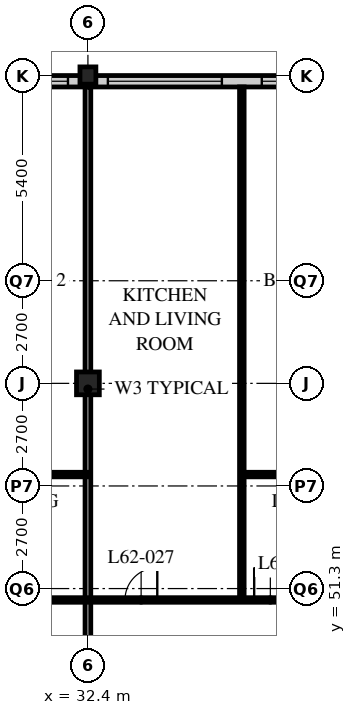
"""IFC4 building model, lengths in metres.
Left out: names, types, materials, properties, quantities, classifications, styles, units other than length and angle.
Written with IfcOpenShell. Run it as: python <this file> out.ifc"""

import sys

from ifc_helpers import new_model, si_unit, direction, frame, frame_2d, origin, origin_2d, place, context, subcontext, project, spatial, rectangle, hollow_rectangle, i_section, extrude, element, fill, save


model = new_model("IFC4")
c1 = context("Model", 3, precision=1e-05, world=origin(), true_north=direction((0.0, 1.0)))
c2 = subcontext(c1, "Body", "Model", "MODEL_VIEW")
j1 = project(units=[si_unit("LENGTHUNIT", "METRE"), si_unit("PLANEANGLEUNIT", "RADIAN")], contexts=[c1])
p1 = place(None, origin())
s1 = spatial("IfcSite", under=j1, at=p1, CompositionType="ELEMENT")
p2 = place(p1, origin())
s2 = spatial("IfcBuilding", under=s1, at=p2, CompositionType="ELEMENT")
p3 = place(p2, frame((0.0, 0.0, 242.4)))
s3 = spatial("IfcBuildingStorey", under=s2, at=p3, CompositionType="ELEMENT", Elevation=242.4)
p4 = place(p3, frame((32.4, 56.7, 0.0), z_axis=(0.0, 0.0, 1.0), x_axis=(1.0, 0.0, 0.0)))
e1 = element("IfcColumn", 1, at=p4, inside=s3, PredefinedType="COLUMN", context=c2, shape_type="SweptSolid", body=[
    extrude(hollow_rectangle(XDim=0.6, YDim=0.6, WallThickness=0.05, at=origin_2d()), origin(), (0.0, 0.0, 1.0), 3.9),
])
p5 = place(p3, frame((32.4, 64.8, 0.0), z_axis=(0.0, 0.0, 1.0), x_axis=(1.0, 0.0, 0.0)))
e2 = element("IfcColumn", 2, at=p5, inside=s3, PredefinedType="COLUMN", context=c2, shape_type="SweptSolid", body=[
    extrude(i_section(OverallWidth=0.418, OverallDepth=0.456, WebThickness=0.042, FlangeThickness=0.067, FilletRadius=0.015, at=origin_2d()), origin(), (0.0, 0.0, 1.0), 3.9),
])
p6 = place(p3, frame((48.3, 64.65, 0.0), z_axis=(0.0, 0.0, 1.0), x_axis=(-1.0, 0.0, 0.0)))
e3 = element("IfcWall", 3, at=p6, inside=s3, PredefinedType="SOLIDWALL", context=c2, shape_type="SweptSolid", body=[
    extrude(rectangle(XDim=40.2, YDim=0.3, at=frame_2d((20.1, 0.0))), origin(), (0.0, 0.0, 1.0), 3.69),
])
p7 = place(p6, frame((0.225, 0.0, 0.6)))
e4 = element("IfcOpeningElement", 4, at=p7, cuts=e3, PredefinedType="OPENING", context=c2, shape_type="SweptSolid", body=[
    extrude(rectangle(XDim=3.0, YDim=2.3, at=frame_2d((1.5, 1.15))), frame((0.0, 0.16, 0.0), z_axis=(0.0, -1.0, 0.0), x_axis=(1.0, 0.0, 0.0)), (0.0, 0.0, 1.0), 0.32),
])
p8 = place(p6, frame((4.275, 0.0, 0.6)))
e5 = element("IfcOpeningElement", 5, at=p8, cuts=e3, PredefinedType="OPENING", context=c2, shape_type="SweptSolid", body=[
    extrude(rectangle(XDim=3.0, YDim=2.3, at=frame_2d((1.5, 1.15))), frame((0.0, 0.16, 0.0), z_axis=(0.0, -1.0, 0.0), x_axis=(1.0, 0.0, 0.0)), (0.0, 0.0, 1.0), 0.32),
])
p9 = place(p6, frame((8.325, 0.0, 0.6)))
e6 = element("IfcOpeningElement", 6, at=p9, cuts=e3, PredefinedType="OPENING", context=c2, shape_type="SweptSolid", body=[
    extrude(rectangle(XDim=3.0, YDim=2.3, at=frame_2d((1.5, 1.15))), frame((0.0, 0.16, 0.0), z_axis=(0.0, -1.0, 0.0), x_axis=(1.0, 0.0, 0.0)), (0.0, 0.0, 1.0), 0.32),
])
p10 = place(p6, frame((12.375, 0.0, 0.6)))
e7 = element("IfcOpeningElement", 7, at=p10, cuts=e3, PredefinedType="OPENING", context=c2, shape_type="SweptSolid", body=[
    extrude(rectangle(XDim=3.0, YDim=2.3, at=frame_2d((1.5, 1.15))), frame((0.0, 0.16, 0.0), z_axis=(0.0, -1.0, 0.0), x_axis=(1.0, 0.0, 0.0)), (0.0, 0.0, 1.0), 0.32),
])
p11 = place(p6, frame((16.425, 0.0, 0.6)))
e8 = element("IfcOpeningElement", 8, at=p11, cuts=e3, PredefinedType="OPENING", context=c2, shape_type="SweptSolid", body=[
    extrude(rectangle(XDim=3.0, YDim=2.3, at=frame_2d((1.5, 1.15))), frame((0.0, 0.16, 0.0), z_axis=(0.0, -1.0, 0.0), x_axis=(1.0, 0.0, 0.0)), (0.0, 0.0, 1.0), 0.32),
])
p12 = place(p6, frame((20.475, 0.0, 0.6)))
e9 = element("IfcOpeningElement", 9, at=p12, cuts=e3, PredefinedType="OPENING", context=c2, shape_type="SweptSolid", body=[
    extrude(rectangle(XDim=3.0, YDim=2.3, at=frame_2d((1.5, 1.15))), frame((0.0, 0.16, 0.0), z_axis=(0.0, -1.0, 0.0), x_axis=(1.0, 0.0, 0.0)), (0.0, 0.0, 1.0), 0.32),
])
p13 = place(p6, frame((24.525, 0.0, 0.6)))
e10 = element("IfcOpeningElement", 10, at=p13, cuts=e3, PredefinedType="OPENING", context=c2, shape_type="SweptSolid", body=[
    extrude(rectangle(XDim=3.0, YDim=2.3, at=frame_2d((1.5, 1.15))), frame((0.0, 0.16, 0.0), z_axis=(0.0, -1.0, 0.0), x_axis=(1.0, 0.0, 0.0)), (0.0, 0.0, 1.0), 0.32),
])
p14 = place(p6, frame((28.575, 0.0, 0.6)))
e11 = element("IfcOpeningElement", 11, at=p14, cuts=e3, PredefinedType="OPENING", context=c2, shape_type="SweptSolid", body=[
    extrude(rectangle(XDim=3.0, YDim=2.3, at=frame_2d((1.5, 1.15))), frame((0.0, 0.16, 0.0), z_axis=(0.0, -1.0, 0.0), x_axis=(1.0, 0.0, 0.0)), (0.0, 0.0, 1.0), 0.32),
])
p15 = place(p6, frame((32.625, 0.0, 0.6)))
e12 = element("IfcOpeningElement", 12, at=p15, cuts=e3, PredefinedType="OPENING", context=c2, shape_type="SweptSolid", body=[
    extrude(rectangle(XDim=3.0, YDim=2.3, at=frame_2d((1.5, 1.15))), frame((0.0, 0.16, 0.0), z_axis=(0.0, -1.0, 0.0), x_axis=(1.0, 0.0, 0.0)), (0.0, 0.0, 1.0), 0.32),
])
p16 = place(p6, frame((36.675, 0.0, 0.6)))
e13 = element("IfcOpeningElement", 13, at=p16, cuts=e3, PredefinedType="OPENING", context=c2, shape_type="SweptSolid", body=[
    extrude(rectangle(XDim=3.0, YDim=2.3, at=frame_2d((1.5, 1.15))), frame((0.0, 0.16, 0.0), z_axis=(0.0, -1.0, 0.0), x_axis=(1.0, 0.0, 0.0)), (0.0, 0.0, 1.0), 0.32),
])
p17 = place(p3, frame((32.4, 48.6, 0.0), z_axis=(0.0, 0.0, 1.0), x_axis=(0.0, 1.0, 0.0)))
e14 = element("IfcWall", 14, at=p17, inside=s3, PredefinedType="PARTITIONING", context=c2, shape_type="SweptSolid", body=[
    extrude(rectangle(XDim=15.9, YDim=0.15, at=frame_2d((7.95, 0.0))), origin(), (0.0, 0.0, 1.0), 2.928),
])
p18 = place(p3, frame((36.45, 51.0, 0.0), z_axis=(0.0, 0.0, 1.0), x_axis=(0.0, 1.0, 0.0)))
e15 = element("IfcWall", 15, at=p18, inside=s3, PredefinedType="PARTITIONING", context=c2, shape_type="SweptSolid", body=[
    extrude(rectangle(XDim=13.5, YDim=0.12, at=frame_2d((6.75, 0.0))), origin(), (0.0, 0.0, 1.0), 3.69),
])
p19 = place(p3, frame((8.15, 51.0, 0.0), z_axis=(0.0, 0.0, 1.0), x_axis=(1.0, 0.0, 0.0)))
e16 = element("IfcWall", 16, at=p19, inside=s3, PredefinedType="PARTITIONING", context=c2, shape_type="SweptSolid", body=[
    extrude(rectangle(XDim=40.4, YDim=0.12, at=frame_2d((20.2, 0.0))), origin(), (0.0, 0.0, 1.0), 3.69),
])
p20 = place(p19, frame((9.025, 0.0, 0.0)))
e17 = element("IfcOpeningElement", 17, at=p20, cuts=e16, PredefinedType="OPENING", context=c2, shape_type="SweptSolid", body=[
    extrude(rectangle(XDim=0.85, YDim=2.1, at=frame_2d((0.425, 1.05))), frame((0.0, 0.07, 0.0), z_axis=(0.0, -1.0, 0.0), x_axis=(1.0, 0.0, 0.0)), (0.0, 0.0, 1.0), 0.14),
])
p21 = place(p19, frame((16.475, 0.0, 0.0)))
e18 = element("IfcOpeningElement", 18, at=p21, cuts=e16, PredefinedType="OPENING", context=c2, shape_type="SweptSolid", body=[
    extrude(rectangle(XDim=0.85, YDim=2.1, at=frame_2d((0.425, 1.05))), frame((0.0, 0.07, 0.0), z_axis=(0.0, -1.0, 0.0), x_axis=(1.0, 0.0, 0.0)), (0.0, 0.0, 1.0), 0.14),
])
p22 = place(p19, frame((20.525, 0.0, 0.0)))
e19 = element("IfcOpeningElement", 19, at=p22, cuts=e16, PredefinedType="OPENING", context=c2, shape_type="SweptSolid", body=[
    extrude(rectangle(XDim=0.85, YDim=2.1, at=frame_2d((0.425, 1.05))), frame((0.0, 0.07, 0.0), z_axis=(0.0, -1.0, 0.0), x_axis=(1.0, 0.0, 0.0)), (0.0, 0.0, 1.0), 0.14),
])
p23 = place(p19, frame((25.225, 0.0, 0.0)))
e20 = element("IfcOpeningElement", 20, at=p23, cuts=e16, PredefinedType="OPENING", context=c2, shape_type="SweptSolid", body=[
    extrude(rectangle(XDim=0.85, YDim=2.1, at=frame_2d((0.425, 1.05))), frame((0.0, 0.07, 0.0), z_axis=(0.0, -1.0, 0.0), x_axis=(1.0, 0.0, 0.0)), (0.0, 0.0, 1.0), 0.14),
])
p24 = place(p19, frame((28.625, 0.0, 0.0)))
e21 = element("IfcOpeningElement", 21, at=p24, cuts=e16, PredefinedType="OPENING", context=c2, shape_type="SweptSolid", body=[
    extrude(rectangle(XDim=0.85, YDim=2.1, at=frame_2d((0.425, 1.05))), frame((0.0, 0.07, 0.0), z_axis=(0.0, -1.0, 0.0), x_axis=(1.0, 0.0, 0.0)), (0.0, 0.0, 1.0), 0.14),
])
p25 = place(p19, frame((32.825, 0.0, 0.0)))
e22 = element("IfcOpeningElement", 22, at=p25, cuts=e16, PredefinedType="OPENING", context=c2, shape_type="SweptSolid", body=[
    extrude(rectangle(XDim=0.85, YDim=2.1, at=frame_2d((0.425, 1.05))), frame((0.0, 0.07, 0.0), z_axis=(0.0, -1.0, 0.0), x_axis=(1.0, 0.0, 0.0)), (0.0, 0.0, 1.0), 0.14),
])
p26 = place(p19, frame((36.675, 0.0, 0.0)))
e23 = element("IfcOpeningElement", 23, at=p26, cuts=e16, PredefinedType="OPENING", context=c2, shape_type="SweptSolid", body=[
    extrude(rectangle(XDim=0.85, YDim=2.1, at=frame_2d((0.425, 1.05))), frame((0.0, 0.07, 0.0), z_axis=(0.0, -1.0, 0.0), x_axis=(1.0, 0.0, 0.0)), (0.0, 0.0, 1.0), 0.14),
])
p27 = place(p19, frame((6.725, 0.0, 0.0)))
e24 = element("IfcOpeningElement", 24, at=p27, cuts=e16, PredefinedType="OPENING", context=c2, shape_type="SweptSolid", body=[
    extrude(rectangle(XDim=0.85, YDim=2.1, at=frame_2d((0.425, 1.05))), frame((0.0, 0.07, 0.0), z_axis=(0.0, -1.0, 0.0), x_axis=(1.0, 0.0, 0.0)), (0.0, 0.0, 1.0), 0.14),
])
p28 = place(p19, frame((2.875, 0.0, 0.0)))
e25 = element("IfcOpeningElement", 25, at=p28, cuts=e16, PredefinedType="OPENING", context=c2, shape_type="SweptSolid", body=[
    extrude(rectangle(XDim=0.85, YDim=2.1, at=frame_2d((0.425, 1.05))), frame((0.0, 0.07, 0.0), z_axis=(0.0, -1.0, 0.0), x_axis=(1.0, 0.0, 0.0)), (0.0, 0.0, 1.0), 0.14),
])
p29 = place(p3, frame((28.35, 54.3, 0.0), z_axis=(0.0, 0.0, 1.0), x_axis=(1.0, 0.0, 0.0)))
e26 = element("IfcWall", 26, at=p29, inside=s3, PredefinedType="PARTITIONING", context=c2, shape_type="SweptSolid", body=[
    extrude(rectangle(XDim=4.05, YDim=0.12, at=frame_2d((2.025, 0.0))), origin(), (0.0, 0.0, 1.0), 3.69),
])
p30 = place(p29, frame((1.6, 0.0, 0.0)))
e27 = element("IfcOpeningElement", 27, at=p30, cuts=e26, PredefinedType="OPENING", context=c2, shape_type="SweptSolid", body=[
    extrude(rectangle(XDim=0.85, YDim=2.1, at=frame_2d((0.425, 1.05))), frame((0.0, 0.07, 0.0), z_axis=(0.0, -1.0, 0.0), x_axis=(1.0, 0.0, 0.0)), (0.0, 0.0, 1.0), 0.14),
])
p31 = place(p3, frame((36.45, 54.3, 0.0), z_axis=(0.0, 0.0, 1.0), x_axis=(1.0, 0.0, 0.0)))
e28 = element("IfcWall", 28, at=p31, inside=s3, PredefinedType="PARTITIONING", context=c2, shape_type="SweptSolid", body=[
    extrude(rectangle(XDim=8.1, YDim=0.12, at=frame_2d((4.05, 0.0))), origin(), (0.0, 0.0, 1.0), 3.69),
])
p32 = place(p31, frame((1.6, 0.0, 0.0)))
e29 = element("IfcOpeningElement", 29, at=p32, cuts=e28, PredefinedType="OPENING", context=c2, shape_type="SweptSolid", body=[
    extrude(rectangle(XDim=0.85, YDim=2.1, at=frame_2d((0.425, 1.05))), frame((0.0, 0.07, 0.0), z_axis=(0.0, -1.0, 0.0), x_axis=(1.0, 0.0, 0.0)), (0.0, 0.0, 1.0), 0.14),
])
p33 = place(p31, frame((5.65, 0.0, 0.0)))
e30 = element("IfcOpeningElement", 30, at=p33, cuts=e28, PredefinedType="OPENING", context=c2, shape_type="SweptSolid", body=[
    extrude(rectangle(XDim=0.85, YDim=2.1, at=frame_2d((0.425, 1.05))), frame((0.0, 0.07, 0.0), z_axis=(0.0, -1.0, 0.0), x_axis=(1.0, 0.0, 0.0)), (0.0, 0.0, 1.0), 0.14),
])
p34 = place(p9, origin())
e31 = element("IfcWindow", 31, at=p34, inside=s3, PartitioningType="SINGLE_PANEL", PredefinedType="WINDOW", context=c2, shape_type="SweptSolid", body=[
    extrude(rectangle(XDim=3.0, YDim=2.3, at=frame_2d((1.5, 1.15))), frame((0.0, 0.03, 0.0), z_axis=(0.0, -1.0, 0.0), x_axis=(1.0, 0.0, 0.0)), (0.0, 0.0, 1.0), 0.06),
])
fill(e6, e31)
p35 = place(p10, origin())
e32 = element("IfcWindow", 32, at=p35, inside=s3, PartitioningType="SINGLE_PANEL", PredefinedType="WINDOW", context=c2, shape_type="SweptSolid", body=[
    extrude(rectangle(XDim=3.0, YDim=2.3, at=frame_2d((1.5, 1.15))), frame((0.0, 0.03, 0.0), z_axis=(0.0, -1.0, 0.0), x_axis=(1.0, 0.0, 0.0)), (0.0, 0.0, 1.0), 0.06),
])
fill(e7, e32)
p36 = place(p11, origin())
e33 = element("IfcWindow", 33, at=p36, inside=s3, PartitioningType="SINGLE_PANEL", PredefinedType="WINDOW", context=c2, shape_type="SweptSolid", body=[
    extrude(rectangle(XDim=3.0, YDim=2.3, at=frame_2d((1.5, 1.15))), frame((0.0, 0.03, 0.0), z_axis=(0.0, -1.0, 0.0), x_axis=(1.0, 0.0, 0.0)), (0.0, 0.0, 1.0), 0.06),
])
fill(e8, e33)
p37 = place(p23, origin())
e34 = element("IfcDoor", 34, at=p37, inside=s3, OperationType="SINGLE_SWING_RIGHT", PredefinedType="DOOR", context=c2, shape_type="SweptSolid", body=[
    extrude(rectangle(XDim=0.85, YDim=2.1, at=frame_2d((0.425, 1.05))), frame((0.0, 0.025, 0.0), z_axis=(0.0, -1.0, 0.0), x_axis=(1.0, 0.0, 0.0)), (0.0, 0.0, 1.0), 0.05),
])
fill(e20, e34)
p38 = place(p24, origin())
e35 = element("IfcDoor", 35, at=p38, inside=s3, OperationType="SINGLE_SWING_LEFT", PredefinedType="DOOR", context=c2, shape_type="SweptSolid", body=[
    extrude(rectangle(XDim=0.85, YDim=2.1, at=frame_2d((0.425, 1.05))), frame((0.0, 0.025, 0.0), z_axis=(0.0, -1.0, 0.0), x_axis=(1.0, 0.0, 0.0)), (0.0, 0.0, 1.0), 0.05),
])
fill(e21, e35)
save(model, sys.argv[1])
